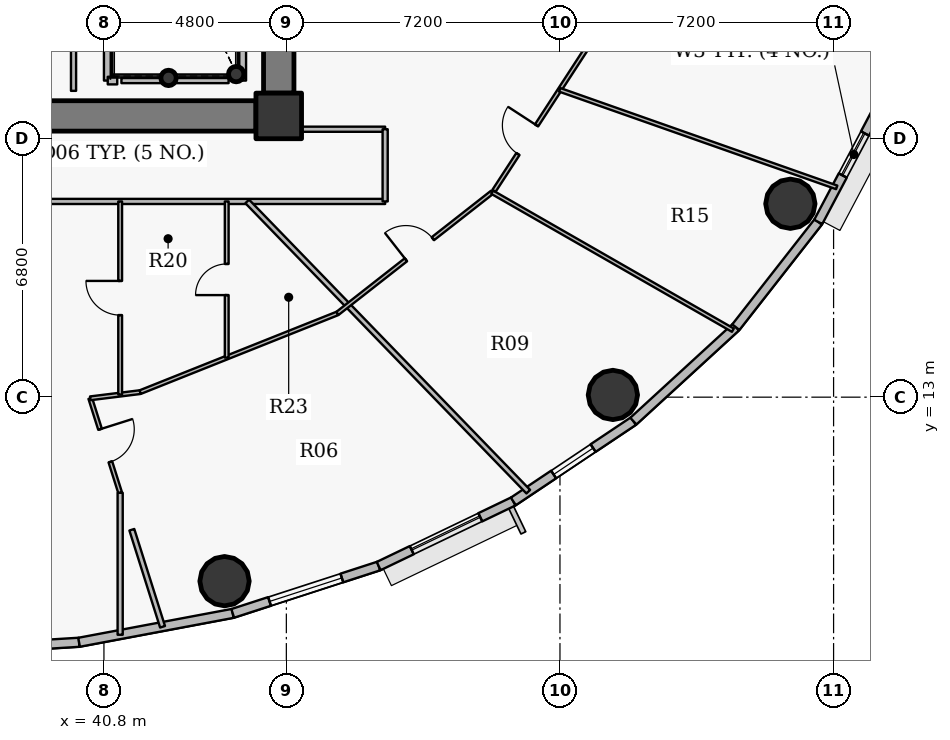
"""IFC4 building model, lengths in metres.
Left out: names, types, materials, properties, quantities, classifications, styles, units other than length and angle.
Written with IfcOpenShell. Run it as: python <this file> out.ifc"""

import sys

from ifc_helpers import new_model, si_unit, direction, frame, frame_2d, origin, origin_2d, place, context, subcontext, project, spatial, rectangle, hollow_circle, extrude, source, transform, mapped, element, fill, save


model = new_model("IFC4")
c1 = context("Model", 3, precision=1e-05, world=origin(), true_north=direction((0.0, 1.0)))
c2 = subcontext(c1, "Body", "Model", "MODEL_VIEW")
j1 = project(units=[si_unit("LENGTHUNIT", "METRE"), si_unit("PLANEANGLEUNIT", "RADIAN")], contexts=[c1])
p1 = place(None, origin())
s1 = spatial("IfcSite", under=j1, at=p1, CompositionType="ELEMENT")
p2 = place(p1, origin())
s2 = spatial("IfcBuilding", under=s1, at=p2, CompositionType="ELEMENT")
p3 = place(p2, frame((0.0, 0.0, 201.15)))
s3 = spatial("IfcBuildingStorey", under=s2, at=p3, CompositionType="ELEMENT", Elevation=201.15)
p4 = place(p3, frame((45.4, 20.4, 0.0), z_axis=(0.0, 0.0, 1.0), x_axis=(1.0, 0.0, 0.0)))
e1 = element("IfcColumn", 1, at=p4, inside=s3, PredefinedType="COLUMN", context=c2, shape_type="SweptSolid", body=[
    extrude(rectangle(XDim=1.2, YDim=1.2, at=origin_2d()), origin(), (0.0, 0.0, 1.0), 3.75),
])
for number, where, z_axis, x_axis in (
    (2, (44.28, 21.5, 0.0), (0.0, 0.0, 1.0), (1.0, 0.0, 0.0)),
    (3, (42.5, 21.4, 0.0), (0.0, 0.0, 1.0), (1.0, 0.0, 0.0)),
):
    element("IfcColumn", number, at=place(p3, frame(where, z_axis=z_axis, x_axis=x_axis)), inside=s3, PredefinedType="COLUMN", context=c2, shape_type="SweptSolid", body=[
        extrude(hollow_circle(Radius=0.203, WallThickness=0.016, at=origin_2d()), origin(), (0.0, 0.0, 1.0), 3.75),
    ])
p5 = place(p3, frame((45.4, 33.0, 0.0), z_axis=(0.0, 0.0, 1.0), x_axis=(0.0, -1.0, 0.0)))
e4 = element("IfcWall", 4, at=p5, inside=s3, PredefinedType="SHEAR", context=c2, shape_type="SweptSolid", body=[
    extrude(rectangle(XDim=12.0, YDim=0.8, at=frame_2d((6.0, 0.0))), origin(), (0.0, 0.0, 1.0), 2.9),
])
p6 = place(p3, frame((44.8, 20.4, 0.0), z_axis=(0.0, 0.0, 1.0), x_axis=(-1.0, 0.0, 0.0)))
e5 = element("IfcWall", 5, at=p6, inside=s3, PredefinedType="SHEAR", context=c2, shape_type="SweptSolid", body=[
    extrude(rectangle(XDim=17.6, YDim=0.8, at=frame_2d((8.8, 0.0))), origin(), (0.0, 0.0, 1.0), 2.9),
])
p7 = place(p6, frame((9.55, 0.0, 0.0)))
e6 = element("IfcOpeningElement", 6, at=p7, cuts=e5, PredefinedType="OPENING", context=c2, shape_type="SweptSolid", body=[
    extrude(rectangle(XDim=1.15, YDim=2.15, at=origin_2d()), frame((0.575, 0.41, 1.075), z_axis=(0.0, -1.0, 0.0), x_axis=(1.0, 0.0, 0.0)), (0.0, 0.0, 1.0), 0.82),
])
for number, where, z_axis, x_axis in (
    (7, (43.973, 8.159, 0.0), (0.0, 0.0, 1.0), (1.0, 0.0, 0.0)),
    (8, (54.192, 13.058, 0.0), (0.0, 0.0, 1.0), (1.0, 0.0, 0.0)),
    (9, (58.863, 18.089, 0.0), (0.0, 0.0, 1.0), (1.0, 0.0, 0.0)),
):
    element("IfcColumn", number, at=place(p3, frame(where, z_axis=z_axis, x_axis=x_axis)), inside=s3, PredefinedType="COLUMN", context=c2, shape_type="SweptSolid", body=[
        extrude(hollow_circle(Radius=0.65, WallThickness=0.04, at=origin_2d()), origin(), (0.0, 0.0, 1.0), 3.75),
    ])
p8 = place(p3, frame((40.146, 6.551, 0.0), z_axis=(0.0, 0.0, 1.0), x_axis=(-0.998104600619, -0.061540281305, 0.0)))
e10 = element("IfcWall", 10, at=p8, inside=s3, PredefinedType="SOLIDWALL", context=c2, shape_type="SweptSolid", body=[
    extrude(rectangle(XDim=4.154, YDim=0.24, at=frame_2d((2.077, 0.0))), origin(), (0.0, 0.0, 1.0), 3.45),
])
p9 = place(p8, frame((1.077, 0.0, 0.9)))
e11 = element("IfcOpeningElement", 11, at=p9, cuts=e10, PredefinedType="OPENING", context=c2, shape_type="SweptSolid", body=[
    extrude(rectangle(XDim=2.0, YDim=1.75, at=origin_2d()), frame((1.0, 0.13, 0.875), z_axis=(0.0, -1.0, 0.0), x_axis=(1.0, 0.0, 0.0)), (0.0, 0.0, 1.0), 0.26),
])
p10 = place(p3, frame((44.189, 7.311, 0.0), z_axis=(0.0, 0.0, 1.0), x_axis=(-0.982788108205, -0.184736391573, 0.0)))
e12 = element("IfcWall", 12, at=p10, inside=s3, PredefinedType="SOLIDWALL", context=c2, shape_type="SweptSolid", body=[
    extrude(rectangle(XDim=4.114, YDim=0.24, at=frame_2d((2.057, 0.0))), origin(), (0.0, 0.0, 1.0), 3.45),
])
p11 = place(p3, frame((48.03, 8.556, 0.0), z_axis=(0.0, 0.0, 1.0), x_axis=(-0.951209870236, -0.30854462038, 0.0)))
e13 = element("IfcWall", 13, at=p11, inside=s3, PredefinedType="SOLIDWALL", context=c2, shape_type="SweptSolid", body=[
    extrude(rectangle(XDim=4.038, YDim=0.24, at=frame_2d((2.019, 0.0))), origin(), (0.0, 0.0, 1.0), 3.45),
])
p12 = place(p11, frame((1.019, 0.0, 0.9)))
e14 = element("IfcOpeningElement", 14, at=p12, cuts=e13, PredefinedType="OPENING", context=c2, shape_type="SweptSolid", body=[
    extrude(rectangle(XDim=2.0, YDim=1.75, at=origin_2d()), frame((1.0, 0.13, 0.875), z_axis=(0.0, -1.0, 0.0), x_axis=(1.0, 0.0, 0.0)), (0.0, 0.0, 1.0), 0.26),
])
p13 = place(p3, frame((51.573, 10.257, 0.0), z_axis=(0.0, 0.0, 1.0), x_axis=(-0.901564733809, -0.432644231155, 0.0)))
e15 = element("IfcWall", 15, at=p13, inside=s3, PredefinedType="SOLIDWALL", context=c2, shape_type="SweptSolid", body=[
    extrude(rectangle(XDim=3.93, YDim=0.24, at=frame_2d((1.965, 0.0))), origin(), (0.0, 0.0, 1.0), 3.45),
])
p14 = place(p13, frame((0.965, 0.0, 0.9)))
e16 = element("IfcOpeningElement", 16, at=p14, cuts=e15, PredefinedType="OPENING", context=c2, shape_type="SweptSolid", body=[
    extrude(rectangle(XDim=2.0, YDim=1.75, at=origin_2d()), frame((1.0, 0.13, 0.875), z_axis=(0.0, -1.0, 0.0), x_axis=(1.0, 0.0, 0.0)), (0.0, 0.0, 1.0), 0.26),
])
p15 = place(p3, frame((54.732, 12.369, 0.0), z_axis=(0.0, 0.0, 1.0), x_axis=(-0.831228998277, -0.555930168657, 0.0)))
e17 = element("IfcWall", 17, at=p15, inside=s3, PredefinedType="SOLIDWALL", context=c2, shape_type="SweptSolid", body=[
    extrude(rectangle(XDim=3.8, YDim=0.24, at=frame_2d((1.9, 0.0))), origin(), (0.0, 0.0, 1.0), 3.45),
])
p16 = place(p15, frame((1.275, 0.0, 0.9)))
e18 = element("IfcOpeningElement", 18, at=p16, cuts=e17, PredefinedType="OPENING", context=c2, shape_type="SweptSolid", body=[
    extrude(rectangle(XDim=1.25, YDim=1.65, at=origin_2d()), frame((0.625, 0.13, 0.825), z_axis=(0.0, -1.0, 0.0), x_axis=(1.0, 0.0, 0.0)), (0.0, 0.0, 1.0), 0.26),
])
p17 = place(p3, frame((57.428, 14.842, 0.0), z_axis=(0.0, 0.0, 1.0), x_axis=(-0.737076565834, -0.675809245349, 0.0)))
e19 = element("IfcWall", 19, at=p17, inside=s3, PredefinedType="SOLIDWALL", context=c2, shape_type="SweptSolid", body=[
    extrude(rectangle(XDim=3.658, YDim=0.24, at=frame_2d((1.829, 0.0))), origin(), (0.0, 0.0, 1.0), 3.45),
])
p18 = place(p3, frame((59.596, 17.612, 0.0), z_axis=(0.0, 0.0, 1.0), x_axis=(-0.616287674549, -0.787521112224, 0.0)))
e20 = element("IfcWall", 20, at=p18, inside=s3, PredefinedType="SOLIDWALL", context=c2, shape_type="SweptSolid", body=[
    extrude(rectangle(XDim=3.517, YDim=0.24, at=frame_2d((1.759, 0.0))), origin(), (0.0, 0.0, 1.0), 3.45),
])
p19 = place(p3, frame((61.183, 20.611, 0.0), z_axis=(0.0, 0.0, 1.0), x_axis=(-0.467586874938, -0.88394712194, 0.0)))
e21 = element("IfcWall", 21, at=p19, inside=s3, PredefinedType="SOLIDWALL", context=c2, shape_type="SweptSolid", body=[
    extrude(rectangle(XDim=3.393, YDim=0.24, at=frame_2d((1.697, 0.0))), origin(), (0.0, 0.0, 1.0), 3.45),
])
p20 = place(p19, frame((0.762, 0.0, 0.9)))
e22 = element("IfcOpeningElement", 22, at=p20, cuts=e21, PredefinedType="OPENING", context=c2, shape_type="SweptSolid", body=[
    extrude(rectangle(XDim=1.25, YDim=1.65, at=origin_2d()), frame((0.625, 0.13, 0.825), z_axis=(0.0, -1.0, 0.0), x_axis=(1.0, 0.0, 0.0)), (0.0, 0.0, 1.0), 0.26),
])
p21 = place(p3, frame((34.605, 18.15, 0.0), z_axis=(0.0, 0.0, 1.0), x_axis=(1.0, 0.0, 0.0)))
e23 = element("IfcWall", 23, at=p21, inside=s3, PredefinedType="PARTITIONING", context=c2, shape_type="SweptSolid", body=[
    extrude(rectangle(XDim=13.595, YDim=0.135, at=frame_2d((6.798, 0.0))), origin(), (0.0, 0.0, 1.0), 2.885),
])
p22 = place(p3, frame((40.44, 12.97, 0.0), z_axis=(0.0, 0.0, 1.0), x_axis=(0.301727202982, -0.953394301945, 0.0)))
e24 = element("IfcWall", 24, at=p22, inside=s3, PredefinedType="PARTITIONING", context=c2, shape_type="SweptSolid", body=[
    extrude(rectangle(XDim=2.608, YDim=0.1, at=frame_2d((1.304, 0.0))), origin(), (0.0, 0.0, 1.0), 3.45),
])
p23 = place(p22, frame((0.854, 0.0, 0.0)))
e25 = element("IfcOpeningElement", 25, at=p23, cuts=e24, PredefinedType="OPENING", context=c2, shape_type="SweptSolid", body=[
    extrude(rectangle(XDim=0.9, YDim=2.1, at=origin_2d()), frame((0.45, 0.06, 1.05), z_axis=(0.0, -1.0, 0.0), x_axis=(1.0, 0.0, 0.0)), (0.0, 0.0, 1.0), 0.12),
])
p24 = place(p3, frame((40.44, 12.97, 0.0), z_axis=(0.0, 0.0, 1.0), x_axis=(0.99240503164, 0.123013223584, 0.0)))
e26 = element("IfcWall", 26, at=p24, inside=s3, PredefinedType="PARTITIONING", context=c2, shape_type="SweptSolid", body=[
    extrude(rectangle(XDim=1.324, YDim=0.1, at=frame_2d((0.662, 0.0))), origin(), (0.0, 0.0, 1.0), 2.885),
])
p25 = place(p3, frame((40.9, 21.33, 0.0), z_axis=(0.0, 0.0, 1.0), x_axis=(0.0, 1.0, 0.0)))
e27 = element("IfcWall", 27, at=p25, inside=s3, PredefinedType="PARTITIONING", context=c2, shape_type="SweptSolid", body=[
    extrude(rectangle(XDim=5.91, YDim=0.2, at=frame_2d((2.955, 0.0))), origin(), (0.0, 0.0, 1.0), 2.985),
])
p26 = place(p3, frame((40.9, 21.33, 0.0), z_axis=(0.0, 0.0, 1.0), x_axis=(1.0, 0.0, 0.0)))
e28 = element("IfcWall", 28, at=p26, inside=s3, PredefinedType="PARTITIONING", context=c2, shape_type="SweptSolid", body=[
    extrude(rectangle(XDim=0.25, YDim=0.2, at=frame_2d((0.125, 0.0))), origin(), (0.0, 0.0, 1.0), 2.985),
])
p27 = place(p3, frame((41.227, 13.067, 0.0), z_axis=(0.0, 0.0, 1.0), x_axis=(0.0, 1.0, 0.0)))
e29 = element("IfcWall", 29, at=p27, inside=s3, PredefinedType="PARTITIONING", context=c2, shape_type="SweptSolid", body=[
    extrude(rectangle(XDim=5.083, YDim=0.1, at=frame_2d((2.541, 0.0))), origin(), (0.0, 0.0, 1.0), 2.885),
])
p28 = place(p27, frame((2.091, 0.0, 0.0)))
e30 = element("IfcOpeningElement", 30, at=p28, cuts=e29, PredefinedType="OPENING", context=c2, shape_type="SweptSolid", body=[
    extrude(rectangle(XDim=0.9, YDim=2.1, at=origin_2d()), frame((0.45, 0.06, 1.05), z_axis=(0.0, -1.0, 0.0), x_axis=(1.0, 0.0, 0.0)), (0.0, 0.0, 1.0), 0.12),
])
p29 = place(p3, frame((41.754, 13.133, 0.0), z_axis=(0.0, 0.0, 1.0), x_axis=(0.928798710424, 0.370584613166, 0.0)))
e31 = element("IfcWall", 31, at=p29, inside=s3, PredefinedType="PARTITIONING", context=c2, shape_type="SweptSolid", body=[
    extrude(rectangle(XDim=5.589, YDim=0.1, at=frame_2d((2.794, 0.0))), origin(), (0.0, 0.0, 1.0), 2.885),
])
p30 = place(p3, frame((44.031, 14.041, 0.0), z_axis=(0.0, 0.0, 1.0), x_axis=(0.0, 1.0, 0.0)))
e32 = element("IfcWall", 32, at=p30, inside=s3, PredefinedType="PARTITIONING", context=c2, shape_type="SweptSolid", body=[
    extrude(rectangle(XDim=4.109, YDim=0.1, at=frame_2d((2.054, 0.0))), origin(), (0.0, 0.0, 1.0), 3.45),
])
p31 = place(p30, frame((1.644, 0.0, 0.0)))
e33 = element("IfcOpeningElement", 33, at=p31, cuts=e32, PredefinedType="OPENING", context=c2, shape_type="SweptSolid", body=[
    extrude(rectangle(XDim=0.82, YDim=2.1, at=origin_2d()), frame((0.41, 0.06, 1.05), z_axis=(0.0, -1.0, 0.0), x_axis=(1.0, 0.0, 0.0)), (0.0, 0.0, 1.0), 0.12),
])
p32 = place(p3, frame((44.44, 21.33, 0.0), z_axis=(0.0, 0.0, 1.0), x_axis=(0.0, 1.0, 0.0)))
e34 = element("IfcWall", 34, at=p32, inside=s3, PredefinedType="PARTITIONING", context=c2, shape_type="SweptSolid", body=[
    extrude(rectangle(XDim=8.52, YDim=0.2, at=frame_2d((4.26, 0.0))), origin(), (0.0, 0.0, 1.0), 3.45),
])
p33 = place(p3, frame((44.571, 18.15, 0.0), z_axis=(0.0, 0.0, 1.0), x_axis=(0.695670435579, -0.718361082647, 0.0)))
e35 = element("IfcWall", 35, at=p33, inside=s3, PredefinedType="PARTITIONING", context=c2, shape_type="SweptSolid", body=[
    extrude(rectangle(XDim=10.63, YDim=0.135, at=frame_2d((5.315, 0.0))), origin(), (0.0, 0.0, 1.0), 2.885),
])
p34 = place(p3, frame((45.8, 20.05, 0.0), z_axis=(0.0, 0.0, 1.0), x_axis=(1.0, 0.0, 0.0)))
e36 = element("IfcWall", 36, at=p34, inside=s3, PredefinedType="PARTITIONING", context=c2, shape_type="SweptSolid", body=[
    extrude(rectangle(XDim=2.4, YDim=0.135, at=frame_2d((1.2, 0.0))), origin(), (0.0, 0.0, 1.0), 3.45),
])
p35 = place(p3, frame((46.945, 15.204, 0.0), z_axis=(0.0, 0.0, 1.0), x_axis=(0.787319701233, 0.616544960282, 0.0)))
e37 = element("IfcWall", 37, at=p35, inside=s3, PredefinedType="PARTITIONING", context=c2, shape_type="SweptSolid", body=[
    extrude(rectangle(XDim=5.172, YDim=0.1, at=frame_2d((2.586, 0.0))), origin(), (0.0, 0.0, 1.0), 2.885),
])
p36 = place(p35, frame((2.289, 0.0, 0.0)))
e38 = element("IfcOpeningElement", 38, at=p36, cuts=e37, PredefinedType="OPENING", context=c2, shape_type="SweptSolid", body=[
    extrude(rectangle(XDim=0.9, YDim=2.1, at=origin_2d()), frame((0.45, 0.06, 1.05), z_axis=(0.0, -1.0, 0.0), x_axis=(1.0, 0.0, 0.0)), (0.0, 0.0, 1.0), 0.12),
])
p37 = place(p3, frame((48.2, 18.15, 0.0), z_axis=(0.0, 0.0, 1.0), x_axis=(0.0, 1.0, 0.0)))
e39 = element("IfcWall", 39, at=p37, inside=s3, PredefinedType="PARTITIONING", context=c2, shape_type="SweptSolid", body=[
    extrude(rectangle(XDim=1.9, YDim=0.135, at=frame_2d((0.95, 0.0))), origin(), (0.0, 0.0, 1.0), 3.45),
])
p38 = place(p3, frame((51.017, 18.393, 0.0), z_axis=(0.0, 0.0, 1.0), x_axis=(0.867591997953, -0.497276708773, 0.0)))
e40 = element("IfcWall", 40, at=p38, inside=s3, PredefinedType="PARTITIONING", context=c2, shape_type="SweptSolid", body=[
    extrude(rectangle(XDim=7.3, YDim=0.1, at=frame_2d((3.65, 0.0))), origin(), (0.0, 0.0, 1.0), 2.885),
])
p39 = place(p3, frame((51.064, 18.429, 0.0), z_axis=(0.0, 0.0, 1.0), x_axis=(0.545382906853, 0.838187022634, 0.0)))
e41 = element("IfcWall", 41, at=p39, inside=s3, PredefinedType="PARTITIONING", context=c2, shape_type="SweptSolid", body=[
    extrude(rectangle(XDim=4.849, YDim=0.1, at=frame_2d((2.425, 0.0))), origin(), (0.0, 0.0, 1.0), 2.885),
])
p40 = place(p39, frame((1.155, 0.0, 0.0)))
e42 = element("IfcOpeningElement", 42, at=p40, cuts=e41, PredefinedType="OPENING", context=c2, shape_type="SweptSolid", body=[
    extrude(rectangle(XDim=0.9, YDim=2.1, at=origin_2d()), frame((0.45, 0.06, 1.05), z_axis=(0.0, -1.0, 0.0), x_axis=(1.0, 0.0, 0.0)), (0.0, 0.0, 1.0), 0.12),
])
p41 = place(p3, frame((52.793, 21.087, 0.0), z_axis=(0.0, 0.0, 1.0), x_axis=(0.94322572083, -0.33215243423, 0.0)))
e43 = element("IfcWall", 43, at=p41, inside=s3, PredefinedType="PARTITIONING", context=c2, shape_type="SweptSolid", body=[
    extrude(rectangle(XDim=7.728, YDim=0.1, at=frame_2d((3.864, 0.0))), origin(), (0.0, 0.0, 1.0), 2.885),
])
p42 = place(p3, frame((44.08, 21.33, 0.0), z_axis=(0.0, 0.0, 1.0), x_axis=(-1.0, 0.0, 0.0)))
e44 = element("IfcWall", 44, at=p42, inside=s3, PredefinedType="PARTITIONING", context=c2, shape_type="SweptSolid", body=[
    extrude(rectangle(XDim=2.82, YDim=0.135, at=frame_2d((1.41, 0.0))), origin(), (0.0, 0.0, 1.0), 2.985),
])
p43 = place(p3, frame((40.0, 23.7, 0.0), z_axis=(0.0, 0.0, 1.0), x_axis=(0.0, -1.0, 0.0)))
e45 = element("IfcWall", 45, at=p43, inside=s3, PredefinedType="PARTITIONING", context=c2, shape_type="SweptSolid", body=[
    extrude(rectangle(XDim=2.64, YDim=0.135, at=frame_2d((1.32, 0.0))), origin(), (0.0, 0.0, 1.0), 2.985),
])
p44 = place(p3, frame((44.81, 20.0, 0.0), z_axis=(0.0, 0.0, 1.0), x_axis=(1.0, 0.0, 0.0)))
e46 = element("IfcWall", 46, at=p44, inside=s3, PredefinedType="PARTITIONING", context=c2, shape_type="SweptSolid", body=[
    extrude(rectangle(XDim=0.98, YDim=0.135, at=frame_2d((0.49, 0.0))), origin(), (0.0, 0.0, 1.0), 2.885),
])
p45 = place(p3, frame((41.227, 10.483, 0.0), z_axis=(0.0, 0.0, 1.0), x_axis=(0.0, -1.0, 0.0)))
e47 = element("IfcWall", 47, at=p45, inside=s3, PredefinedType="PARTITIONING", context=c2, shape_type="SweptSolid", body=[
    extrude(rectangle(XDim=3.735, YDim=0.135, at=frame_2d((1.867, 0.0))), origin(), (0.0, 0.0, 1.0), 2.885),
])
p46 = place(p3, frame((42.343, 6.958, 0.0), z_axis=(0.0, 0.0, 1.0), x_axis=(-0.30175084808, 0.953386818496, 0.0)))
e48 = element("IfcWall", 48, at=p46, inside=s3, PredefinedType="PARTITIONING", context=c2, shape_type="SweptSolid", body=[
    extrude(rectangle(XDim=2.678, YDim=0.135, at=frame_2d((1.339, 0.0))), origin(), (0.0, 0.0, 1.0), 2.885),
])
p47 = place(p3, frame((45.8, 20.377, 0.0), z_axis=(0.0, 0.0, 1.0), x_axis=(0.0, 1.0, 0.0)))
e49 = element("IfcWall", 49, at=p47, inside=s3, PredefinedType="PARTITIONING", context=c2, shape_type="SweptSolid", body=[
    extrude(rectangle(XDim=0.613, YDim=0.135, at=frame_2d((0.306, 0.0))), origin(), (0.0, 0.0, 1.0), 3.45),
])
m1 = source(origin(), c2, "Body", "SweptSolid", [
    extrude(rectangle(XDim=2.0, YDim=1.75, at=origin_2d()), frame((1.0, 0.03, 0.875), z_axis=(0.0, -1.0, 0.0), x_axis=(1.0, 0.0, 0.0)), (0.0, 0.0, 1.0), 0.06),
])
p48 = place(p12, origin())
e50 = element("IfcWindow", 50, at=p48, inside=s3, PartitioningType="DOUBLE_PANEL_VERTICAL", PredefinedType="WINDOW", context=c2, shape_type="MappedRepresentation", body=[
    mapped(m1, transform((0.0, 0.0, 0.0), x_axis=(1.0, 0.0, 0.0), y_axis=(0.0, 1.0, 0.0), z_axis=(0.0, 0.0, 1.0), scale=1.0)),
])
fill(e14, e50)
p49 = place(p14, origin())
e51 = element("IfcWindow", 51, at=p49, inside=s3, PartitioningType="DOUBLE_PANEL_VERTICAL", PredefinedType="WINDOW", context=c2, shape_type="MappedRepresentation", body=[
    mapped(m1, transform((0.0, 0.0, 0.0), x_axis=(1.0, 0.0, 0.0), y_axis=(0.0, 1.0, 0.0), z_axis=(0.0, 0.0, 1.0), scale=1.0)),
])
fill(e16, e51)
m2 = source(origin(), c2, "Body", "SweptSolid", [
    extrude(rectangle(XDim=1.25, YDim=1.65, at=origin_2d()), frame((0.625, 0.03, 0.825), z_axis=(0.0, -1.0, 0.0), x_axis=(1.0, 0.0, 0.0)), (0.0, 0.0, 1.0), 0.06),
])
p50 = place(p20, origin())
e52 = element("IfcWindow", 52, at=p50, inside=s3, PartitioningType="SINGLE_PANEL", PredefinedType="WINDOW", context=c2, shape_type="MappedRepresentation", body=[
    mapped(m2, transform((0.0, 0.0, 0.0), x_axis=(1.0, 0.0, 0.0), y_axis=(0.0, 1.0, 0.0), z_axis=(0.0, 0.0, 1.0), scale=1.0)),
])
fill(e22, e52)
p51 = place(p16, origin())
e53 = element("IfcWindow", 53, at=p51, inside=s3, PartitioningType="SINGLE_PANEL", PredefinedType="WINDOW", context=c2, shape_type="MappedRepresentation", body=[
    mapped(m2, transform((0.0, 0.0, 0.0), x_axis=(1.0, 0.0, 0.0), y_axis=(0.0, 1.0, 0.0), z_axis=(0.0, 0.0, 1.0), scale=1.0)),
])
fill(e18, e53)
m3 = source(origin(), c2, "Body", "SweptSolid", [
    extrude(rectangle(XDim=0.9, YDim=2.1, at=origin_2d()), frame((0.45, 0.025, 1.05), z_axis=(0.0, -1.0, 0.0), x_axis=(1.0, 0.0, 0.0)), (0.0, 0.0, 1.0), 0.05),
])
p52 = place(p23, origin())
e54 = element("IfcDoor", 54, at=p52, inside=s3, OperationType="SINGLE_SWING_LEFT", PredefinedType="DOOR", context=c2, shape_type="MappedRepresentation", body=[
    mapped(m3, transform((0.0, 0.0, 0.0), x_axis=(1.0, 0.0, 0.0), y_axis=(0.0, 1.0, 0.0), z_axis=(0.0, 0.0, 1.0), scale=1.0)),
])
fill(e25, e54)
p53 = place(p28, origin())
e55 = element("IfcDoor", 55, at=p53, inside=s3, OperationType="SINGLE_SWING_RIGHT", PredefinedType="DOOR", context=c2, shape_type="MappedRepresentation", body=[
    mapped(m3, transform((0.0, 0.0, 0.0), x_axis=(1.0, 0.0, 0.0), y_axis=(0.0, 1.0, 0.0), z_axis=(0.0, 0.0, 1.0), scale=1.0)),
])
fill(e30, e55)
m4 = source(origin(), c2, "Body", "SweptSolid", [
    extrude(rectangle(XDim=0.82, YDim=2.1, at=origin_2d()), frame((0.41, 0.025, 1.05), z_axis=(0.0, -1.0, 0.0), x_axis=(1.0, 0.0, 0.0)), (0.0, 0.0, 1.0), 0.05),
])
p54 = place(p31, origin())
e56 = element("IfcDoor", 56, at=p54, inside=s3, OperationType="SINGLE_SWING_LEFT", PredefinedType="DOOR", context=c2, shape_type="MappedRepresentation", body=[
    mapped(m4, transform((0.0, 0.0, 0.0), x_axis=(1.0, 0.0, 0.0), y_axis=(0.0, 1.0, 0.0), z_axis=(0.0, 0.0, 1.0), scale=1.0)),
])
fill(e33, e56)
p55 = place(p36, origin())
e57 = element("IfcDoor", 57, at=p55, inside=s3, OperationType="SINGLE_SWING_LEFT", PredefinedType="DOOR", context=c2, shape_type="MappedRepresentation", body=[
    mapped(m3, transform((0.0, 0.0, 0.0), x_axis=(1.0, 0.0, 0.0), y_axis=(0.0, 1.0, 0.0), z_axis=(0.0, 0.0, 1.0), scale=1.0)),
])
fill(e38, e57)
p56 = place(p40, origin())
e58 = element("IfcDoor", 58, at=p56, inside=s3, OperationType="SINGLE_SWING_RIGHT", PredefinedType="DOOR", context=c2, shape_type="MappedRepresentation", body=[
    mapped(m3, transform((0.0, 0.0, 0.0), x_axis=(1.0, 0.0, 0.0), y_axis=(0.0, 1.0, 0.0), z_axis=(0.0, 0.0, 1.0), scale=1.0)),
])
fill(e42, e58)
save(model, sys.argv[1])
